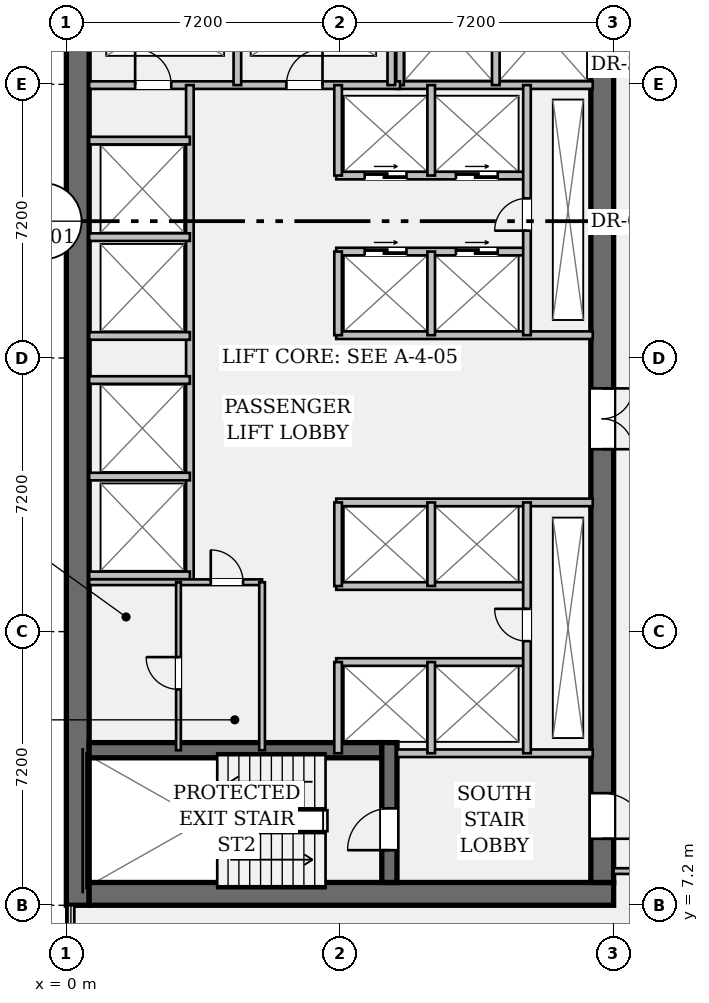
"""IFC4 building model, lengths in metres.
Left out: names, types, materials, properties, quantities, classifications, styles, units other than length and angle.
Written with IfcOpenShell. Run it as: python <this file> out.ifc"""

import sys

from ifc_helpers import new_model, si_unit, direction, frame, frame_2d, origin, place, context, subcontext, project, spatial, rectangle, extrude, element, fill, save


model = new_model("IFC4")
c1 = context("Model", 3, precision=1e-05, world=origin(), true_north=direction((0.0, 1.0)))
c2 = subcontext(c1, "Body", "Model", "MODEL_VIEW")
j1 = project(units=[si_unit("LENGTHUNIT", "METRE"), si_unit("PLANEANGLEUNIT", "RADIAN")], contexts=[c1])
p1 = place(None, origin())
s1 = spatial("IfcSite", under=j1, at=p1, CompositionType="ELEMENT")
p2 = place(p1, origin())
s2 = spatial("IfcBuilding", under=s1, at=p2, CompositionType="ELEMENT")
p3 = place(p2, frame((0.0, 0.0, 81.2)))
s3 = spatial("IfcBuildingStorey", under=s2, at=p3, CompositionType="ELEMENT", Elevation=81.2)
p4 = place(p3, frame((0.3, 7.2, 0.0), z_axis=(0.0, 0.0, 1.0), x_axis=(0.0, 1.0, 0.0)))
e1 = element("IfcWall", 1, at=p4, inside=s3, PredefinedType="SHEAR", context=c2, shape_type="SweptSolid", body=[
    extrude(rectangle(XDim=28.8, YDim=0.6, at=frame_2d((14.4, 0.0))), origin(), (0.0, 0.0, 1.0), 3.57),
])
p5 = place(p3, frame((0.6, 7.5, 0.0), z_axis=(0.0, 0.0, 1.0), x_axis=(1.0, 0.0, 0.0)))
e2 = element("IfcWall", 2, at=p5, inside=s3, PredefinedType="SHEAR", context=c2, shape_type="SweptSolid", body=[
    extrude(rectangle(XDim=13.8, YDim=0.6, at=frame_2d((6.9, 0.0))), origin(), (0.0, 0.0, 1.0), 3.57),
])
p6 = place(p3, frame((14.1, 35.4, 0.0), z_axis=(0.0, 0.0, 1.0), x_axis=(0.0, -1.0, 0.0)))
e3 = element("IfcWall", 3, at=p6, inside=s3, PredefinedType="SHEAR", context=c2, shape_type="SweptSolid", body=[
    extrude(rectangle(XDim=27.6, YDim=0.6, at=frame_2d((13.8, 0.0))), origin(), (0.0, 0.0, 1.0), 3.57),
])
p7 = place(p6, frame((1.3, 0.0, 0.0)))
e4 = element("IfcOpeningElement", 4, at=p7, cuts=e3, PredefinedType="OPENING", context=c2, shape_type="SweptSolid", body=[
    extrude(rectangle(XDim=1.2, YDim=2.15, at=frame_2d((0.6, 1.075))), frame((0.0, 0.312, 0.0), z_axis=(0.0, -1.0, 0.0), x_axis=(1.0, 0.0, 0.0)), (0.0, 0.0, 1.0), 0.624),
])
p8 = place(p6, frame((25.25, 0.0, 0.0)))
e5 = element("IfcOpeningElement", 5, at=p8, cuts=e3, PredefinedType="OPENING", context=c2, shape_type="SweptSolid", body=[
    extrude(rectangle(XDim=1.2, YDim=2.15, at=frame_2d((0.6, 1.075))), frame((0.0, 0.312, 0.0), z_axis=(0.0, -1.0, 0.0), x_axis=(1.0, 0.0, 0.0)), (0.0, 0.0, 1.0), 0.624),
])
p9 = place(p6, frame((14.6, 0.0, 0.0)))
e6 = element("IfcOpeningElement", 6, at=p9, cuts=e3, PredefinedType="OPENING", context=c2, shape_type="SweptSolid", body=[
    extrude(rectangle(XDim=1.6, YDim=2.2, at=frame_2d((0.8, 1.1))), frame((0.0, 0.312, 0.0), z_axis=(0.0, -1.0, 0.0), x_axis=(1.0, 0.0, 0.0)), (0.0, 0.0, 1.0), 0.624),
])
p10 = place(p3, frame((0.6, 11.28, 0.0), z_axis=(0.0, 0.0, 1.0), x_axis=(1.0, 0.0, 0.0)))
e7 = element("IfcWall", 7, at=p10, inside=s3, PredefinedType="SHEAR", context=c2, shape_type="SweptSolid", body=[
    extrude(rectangle(XDim=7.7, YDim=0.4, at=frame_2d((3.85, 0.0))), origin(), (0.0, 0.0, 1.0), 3.57),
])
p11 = place(p3, frame((8.5, 7.8, 0.0), z_axis=(0.0, 0.0, 1.0), x_axis=(0.0, 1.0, 0.0)))
e8 = element("IfcWall", 8, at=p11, inside=s3, PredefinedType="SHEAR", context=c2, shape_type="SweptSolid", body=[
    extrude(rectangle(XDim=3.68, YDim=0.4, at=frame_2d((1.84, 0.0))), origin(), (0.0, 0.0, 1.0), 3.57),
])
p12 = place(p11, frame((0.85, 0.0, 0.0)))
e9 = element("IfcOpeningElement", 9, at=p12, cuts=e8, PredefinedType="OPENING", context=c2, shape_type="SweptSolid", body=[
    extrude(rectangle(XDim=1.1, YDim=2.15, at=frame_2d((0.55, 1.075))), frame((0.0, 0.212, 0.0), z_axis=(0.0, -1.0, 0.0), x_axis=(1.0, 0.0, 0.0)), (0.0, 0.0, 1.0), 0.424),
])
for number, where, z_axis, x_axis in (
    (10, (8.7, 11.2, 0.0), (0.0, 0.0, 1.0), (1.0, 0.0, 0.0)),
    (11, (8.7, 28.78, 0.0), (0.0, 0.0, 1.0), (1.0, 0.0, 0.0)),
):
    element("IfcWall", number, at=place(p3, frame(where, z_axis=z_axis, x_axis=x_axis)), inside=s3, PredefinedType="PARTITIONING", context=c2, shape_type="SweptSolid", body=[
        extrude(rectangle(XDim=5.15, YDim=0.2, at=frame_2d((2.575, 0.0))), origin(), (0.0, 0.0, 1.0), 3.57),
    ])
for number, where, z_axis, x_axis in (
    (12, (8.78, 28.78, 0.0), (0.0, 0.0, 1.0), (0.0, 1.0, 0.0)),
    (13, (11.3, 28.78, 0.0), (0.0, 0.0, 1.0), (0.0, 1.0, 0.0)),
):
    element("IfcWall", number, at=place(p3, frame(where, z_axis=z_axis, x_axis=x_axis)), inside=s3, PredefinedType="PARTITIONING", context=c2, shape_type="SweptSolid", body=[
        extrude(rectangle(XDim=3.1, YDim=0.2, at=frame_2d((1.55, 0.0))), origin(), (0.0, 0.0, 1.0), 3.57),
    ])
p13 = place(p3, frame((0.6, 28.78, 0.0), z_axis=(0.0, 0.0, 1.0), x_axis=(1.0, 0.0, 0.0)))
e14 = element("IfcWall", 14, at=p13, inside=s3, PredefinedType="PARTITIONING", context=c2, shape_type="SweptSolid", body=[
    extrude(rectangle(XDim=8.18, YDim=0.2, at=frame_2d((4.09, 0.0))), origin(), (0.0, 0.0, 1.0), 3.57),
])
p14 = place(p13, frame((1.21, 0.0, 0.0)))
e15 = element("IfcOpeningElement", 15, at=p14, cuts=e14, PredefinedType="OPENING", context=c2, shape_type="SweptSolid", body=[
    extrude(rectangle(XDim=0.95, YDim=2.15, at=frame_2d((0.475, 1.075))), frame((0.0, 0.112, 0.0), z_axis=(0.0, -1.0, 0.0), x_axis=(1.0, 0.0, 0.0)), (0.0, 0.0, 1.0), 0.224),
])
p15 = place(p13, frame((5.19, 0.0, 0.0)))
e16 = element("IfcOpeningElement", 16, at=p15, cuts=e14, PredefinedType="OPENING", context=c2, shape_type="SweptSolid", body=[
    extrude(rectangle(XDim=0.95, YDim=2.15, at=frame_2d((0.475, 1.075))), frame((0.0, 0.112, 0.0), z_axis=(0.0, -1.0, 0.0), x_axis=(1.0, 0.0, 0.0)), (0.0, 0.0, 1.0), 0.224),
])
for number, where, z_axis, x_axis in (
    (17, (4.5, 28.78, 0.0), (0.0, 0.0, 1.0), (0.0, 1.0, 0.0)),
    (18, (8.55, 28.78, 0.0), (0.0, 0.0, 1.0), (0.0, 1.0, 0.0)),
):
    element("IfcWall", number, at=place(p3, frame(where, z_axis=z_axis, x_axis=x_axis)), inside=s3, PredefinedType="PARTITIONING", context=c2, shape_type="SweptSolid", body=[
        extrude(rectangle(XDim=2.94, YDim=0.2, at=frame_2d((1.47, 0.0))), origin(), (0.0, 0.0, 1.0), 3.57),
    ])
p16 = place(p3, frame((3.25, 15.7, 0.0), z_axis=(0.0, 0.0, 1.0), x_axis=(0.0, 1.0, 0.0)))
e19 = element("IfcWall", 19, at=p16, inside=s3, PredefinedType="PARTITIONING", context=c2, shape_type="SweptSolid", body=[
    extrude(rectangle(XDim=13.08, YDim=0.2, at=frame_2d((6.54, 0.0))), origin(), (0.0, 0.0, 1.0), 3.57),
])
for number, where, z_axis, x_axis in (
    (20, (0.6, 15.88, 0.0), (0.0, 0.0, 1.0), (1.0, 0.0, 0.0)),
    (21, (0.6, 18.48, 0.0), (0.0, 0.0, 1.0), (1.0, 0.0, 0.0)),
    (22, (0.6, 22.18, 0.0), (0.0, 0.0, 1.0), (1.0, 0.0, 0.0)),
    (23, (0.6, 24.78, 0.0), (0.0, 0.0, 1.0), (1.0, 0.0, 0.0)),
    (24, (0.6, 21.02, 0.0), (0.0, 0.0, 1.0), (1.0, 0.0, 0.0)),
    (25, (0.6, 27.32, 0.0), (0.0, 0.0, 1.0), (1.0, 0.0, 0.0)),
):
    element("IfcWall", number, at=place(p3, frame(where, z_axis=z_axis, x_axis=x_axis)), inside=s3, PredefinedType="PARTITIONING", context=c2, shape_type="SweptSolid", body=[
        extrude(rectangle(XDim=2.65, YDim=0.2, at=frame_2d((1.325, 0.0))), origin(), (0.0, 0.0, 1.0), 3.57),
    ])
p17 = place(p3, frame((7.1, 22.2, 0.0), z_axis=(0.0, 0.0, 1.0), x_axis=(1.0, 0.0, 0.0)))
e26 = element("IfcWall", 26, at=p17, inside=s3, PredefinedType="PARTITIONING", context=c2, shape_type="SweptSolid", body=[
    extrude(rectangle(XDim=6.75, YDim=0.2, at=frame_2d((3.375, 0.0))), origin(), (0.0, 0.0, 1.0), 3.57),
])
p18 = place(p3, frame((7.1, 24.4, 0.0), z_axis=(0.0, 0.0, 1.0), x_axis=(1.0, 0.0, 0.0)))
e27 = element("IfcWall", 27, at=p18, inside=s3, PredefinedType="PARTITIONING", context=c2, shape_type="SweptSolid", body=[
    extrude(rectangle(XDim=5.02, YDim=0.2, at=frame_2d((2.51, 0.0))), origin(), (0.0, 0.0, 1.0), 3.57),
])
p19 = place(p18, frame((0.75, 0.0, 0.0)))
e28 = element("IfcOpeningElement", 28, at=p19, cuts=e27, PredefinedType="OPENING", context=c2, shape_type="SweptSolid", body=[
    extrude(rectangle(XDim=1.1, YDim=2.2, at=frame_2d((0.55, 1.1))), frame((0.0, 0.112, 0.0), z_axis=(0.0, -1.0, 0.0), x_axis=(1.0, 0.0, 0.0)), (0.0, 0.0, 1.0), 0.224),
])
p20 = place(p18, frame((3.15, 0.0, 0.0)))
e29 = element("IfcOpeningElement", 29, at=p20, cuts=e27, PredefinedType="OPENING", context=c2, shape_type="SweptSolid", body=[
    extrude(rectangle(XDim=1.1, YDim=2.2, at=frame_2d((0.55, 1.1))), frame((0.0, 0.112, 0.0), z_axis=(0.0, -1.0, 0.0), x_axis=(1.0, 0.0, 0.0)), (0.0, 0.0, 1.0), 0.224),
])
p21 = place(p3, frame((7.1, 26.4, 0.0), z_axis=(0.0, 0.0, 1.0), x_axis=(1.0, 0.0, 0.0)))
e30 = element("IfcWall", 30, at=p21, inside=s3, PredefinedType="PARTITIONING", context=c2, shape_type="SweptSolid", body=[
    extrude(rectangle(XDim=5.02, YDim=0.2, at=frame_2d((2.51, 0.0))), origin(), (0.0, 0.0, 1.0), 3.57),
])
p22 = place(p21, frame((0.75, 0.0, 0.0)))
e31 = element("IfcOpeningElement", 31, at=p22, cuts=e30, PredefinedType="OPENING", context=c2, shape_type="SweptSolid", body=[
    extrude(rectangle(XDim=1.1, YDim=2.2, at=frame_2d((0.55, 1.1))), frame((0.0, 0.112, 0.0), z_axis=(0.0, -1.0, 0.0), x_axis=(1.0, 0.0, 0.0)), (0.0, 0.0, 1.0), 0.224),
])
p23 = place(p21, frame((3.15, 0.0, 0.0)))
e32 = element("IfcOpeningElement", 32, at=p23, cuts=e30, PredefinedType="OPENING", context=c2, shape_type="SweptSolid", body=[
    extrude(rectangle(XDim=1.1, YDim=2.2, at=frame_2d((0.55, 1.1))), frame((0.0, 0.112, 0.0), z_axis=(0.0, -1.0, 0.0), x_axis=(1.0, 0.0, 0.0)), (0.0, 0.0, 1.0), 0.224),
])
p24 = place(p3, frame((7.15, 22.2, 0.0), z_axis=(0.0, 0.0, 1.0), x_axis=(0.0, 1.0, 0.0)))
e33 = element("IfcWall", 33, at=p24, inside=s3, PredefinedType="PARTITIONING", context=c2, shape_type="SweptSolid", body=[
    extrude(rectangle(XDim=2.2, YDim=0.2, at=frame_2d((1.1, 0.0))), origin(), (0.0, 0.0, 1.0), 3.57),
])
p25 = place(p3, frame((7.15, 26.4, 0.0), z_axis=(0.0, 0.0, 1.0), x_axis=(0.0, 1.0, 0.0)))
e34 = element("IfcWall", 34, at=p25, inside=s3, PredefinedType="PARTITIONING", context=c2, shape_type="SweptSolid", body=[
    extrude(rectangle(XDim=2.38, YDim=0.2, at=frame_2d((1.19, 0.0))), origin(), (0.0, 0.0, 1.0), 3.57),
])
p26 = place(p3, frame((9.6, 22.2, 0.0), z_axis=(0.0, 0.0, 1.0), x_axis=(0.0, 1.0, 0.0)))
e35 = element("IfcWall", 35, at=p26, inside=s3, PredefinedType="PARTITIONING", context=c2, shape_type="SweptSolid", body=[
    extrude(rectangle(XDim=2.2, YDim=0.2, at=frame_2d((1.1, 0.0))), origin(), (0.0, 0.0, 1.0), 3.57),
])
p27 = place(p3, frame((9.6, 26.4, 0.0), z_axis=(0.0, 0.0, 1.0), x_axis=(0.0, 1.0, 0.0)))
e36 = element("IfcWall", 36, at=p27, inside=s3, PredefinedType="PARTITIONING", context=c2, shape_type="SweptSolid", body=[
    extrude(rectangle(XDim=2.38, YDim=0.2, at=frame_2d((1.19, 0.0))), origin(), (0.0, 0.0, 1.0), 3.57),
])
p28 = place(p3, frame((12.12, 22.2, 0.0), z_axis=(0.0, 0.0, 1.0), x_axis=(0.0, 1.0, 0.0)))
e37 = element("IfcWall", 37, at=p28, inside=s3, PredefinedType="PARTITIONING", context=c2, shape_type="SweptSolid", body=[
    extrude(rectangle(XDim=6.58, YDim=0.2, at=frame_2d((3.29, 0.0))), origin(), (0.0, 0.0, 1.0), 3.57),
])
p29 = place(p28, frame((2.75, 0.0, 0.0)))
e38 = element("IfcOpeningElement", 38, at=p29, cuts=e37, PredefinedType="OPENING", context=c2, shape_type="SweptSolid", body=[
    extrude(rectangle(XDim=0.85, YDim=2.15, at=frame_2d((0.425, 1.075))), frame((0.0, 0.112, 0.0), z_axis=(0.0, -1.0, 0.0), x_axis=(1.0, 0.0, 0.0)), (0.0, 0.0, 1.0), 0.224),
])
p30 = place(p3, frame((7.1, 17.8, 0.0), z_axis=(0.0, 0.0, 1.0), x_axis=(1.0, 0.0, 0.0)))
e39 = element("IfcWall", 39, at=p30, inside=s3, PredefinedType="PARTITIONING", context=c2, shape_type="SweptSolid", body=[
    extrude(rectangle(XDim=6.75, YDim=0.2, at=frame_2d((3.375, 0.0))), origin(), (0.0, 0.0, 1.0), 3.57),
])
for number, where, z_axis, x_axis in (
    (40, (7.1, 15.6, 0.0), (0.0, 0.0, 1.0), (1.0, 0.0, 0.0)),
    (41, (7.1, 13.6, 0.0), (0.0, 0.0, 1.0), (1.0, 0.0, 0.0)),
):
    element("IfcWall", number, at=place(p3, frame(where, z_axis=z_axis, x_axis=x_axis)), inside=s3, PredefinedType="PARTITIONING", context=c2, shape_type="SweptSolid", body=[
        extrude(rectangle(XDim=5.02, YDim=0.2, at=frame_2d((2.51, 0.0))), origin(), (0.0, 0.0, 1.0), 3.57),
    ])
p31 = place(p3, frame((7.15, 15.6, 0.0), z_axis=(0.0, 0.0, 1.0), x_axis=(0.0, 1.0, 0.0)))
e42 = element("IfcWall", 42, at=p31, inside=s3, PredefinedType="PARTITIONING", context=c2, shape_type="SweptSolid", body=[
    extrude(rectangle(XDim=2.2, YDim=0.2, at=frame_2d((1.1, 0.0))), origin(), (0.0, 0.0, 1.0), 3.57),
])
p32 = place(p3, frame((7.15, 11.2, 0.0), z_axis=(0.0, 0.0, 1.0), x_axis=(0.0, 1.0, 0.0)))
e43 = element("IfcWall", 43, at=p32, inside=s3, PredefinedType="PARTITIONING", context=c2, shape_type="SweptSolid", body=[
    extrude(rectangle(XDim=2.4, YDim=0.2, at=frame_2d((1.2, 0.0))), origin(), (0.0, 0.0, 1.0), 3.57),
])
p33 = place(p3, frame((9.6, 15.6, 0.0), z_axis=(0.0, 0.0, 1.0), x_axis=(0.0, 1.0, 0.0)))
e44 = element("IfcWall", 44, at=p33, inside=s3, PredefinedType="PARTITIONING", context=c2, shape_type="SweptSolid", body=[
    extrude(rectangle(XDim=2.2, YDim=0.2, at=frame_2d((1.1, 0.0))), origin(), (0.0, 0.0, 1.0), 3.57),
])
p34 = place(p3, frame((9.6, 11.2, 0.0), z_axis=(0.0, 0.0, 1.0), x_axis=(0.0, 1.0, 0.0)))
e45 = element("IfcWall", 45, at=p34, inside=s3, PredefinedType="PARTITIONING", context=c2, shape_type="SweptSolid", body=[
    extrude(rectangle(XDim=2.4, YDim=0.2, at=frame_2d((1.2, 0.0))), origin(), (0.0, 0.0, 1.0), 3.57),
])
p35 = place(p3, frame((12.12, 11.2, 0.0), z_axis=(0.0, 0.0, 1.0), x_axis=(0.0, 1.0, 0.0)))
e46 = element("IfcWall", 46, at=p35, inside=s3, PredefinedType="PARTITIONING", context=c2, shape_type="SweptSolid", body=[
    extrude(rectangle(XDim=6.6, YDim=0.2, at=frame_2d((3.3, 0.0))), origin(), (0.0, 0.0, 1.0), 3.57),
])
p36 = place(p35, frame((2.95, 0.0, 0.0)))
e47 = element("IfcOpeningElement", 47, at=p36, cuts=e46, PredefinedType="OPENING", context=c2, shape_type="SweptSolid", body=[
    extrude(rectangle(XDim=0.85, YDim=2.15, at=frame_2d((0.425, 1.075))), frame((0.0, 0.112, 0.0), z_axis=(0.0, -1.0, 0.0), x_axis=(1.0, 0.0, 0.0)), (0.0, 0.0, 1.0), 0.224),
])
p37 = place(p3, frame((0.6, 15.7, 0.0), z_axis=(0.0, 0.0, 1.0), x_axis=(1.0, 0.0, 0.0)))
e48 = element("IfcWall", 48, at=p37, inside=s3, PredefinedType="PARTITIONING", context=c2, shape_type="SweptSolid", body=[
    extrude(rectangle(XDim=4.55, YDim=0.15, at=frame_2d((2.275, 0.0))), origin(), (0.0, 0.0, 1.0), 3.57),
])
p38 = place(p37, frame((3.2, 0.0, 0.0)))
e49 = element("IfcOpeningElement", 49, at=p38, cuts=e48, PredefinedType="OPENING", context=c2, shape_type="SweptSolid", body=[
    extrude(rectangle(XDim=0.85, YDim=2.15, at=frame_2d((0.425, 1.075))), frame((0.0, 0.087, 0.0), z_axis=(0.0, -1.0, 0.0), x_axis=(1.0, 0.0, 0.0)), (0.0, 0.0, 1.0), 0.174),
])
p39 = place(p3, frame((5.15, 11.28, 0.0), z_axis=(0.0, 0.0, 1.0), x_axis=(0.0, 1.0, 0.0)))
e50 = element("IfcWall", 50, at=p39, inside=s3, PredefinedType="PARTITIONING", context=c2, shape_type="SweptSolid", body=[
    extrude(rectangle(XDim=4.42, YDim=0.15, at=frame_2d((2.21, 0.0))), origin(), (0.0, 0.0, 1.0), 3.57),
])
p40 = place(p3, frame((2.95, 11.28, 0.0), z_axis=(0.0, 0.0, 1.0), x_axis=(0.0, 1.0, 0.0)))
e51 = element("IfcWall", 51, at=p40, inside=s3, PredefinedType="PARTITIONING", context=c2, shape_type="SweptSolid", body=[
    extrude(rectangle(XDim=4.42, YDim=0.125, at=frame_2d((2.21, 0.0))), origin(), (0.0, 0.0, 1.0), 3.57),
])
p41 = place(p40, frame((1.6, 0.0, 0.0)))
e52 = element("IfcOpeningElement", 52, at=p41, cuts=e51, PredefinedType="OPENING", context=c2, shape_type="SweptSolid", body=[
    extrude(rectangle(XDim=0.85, YDim=2.15, at=frame_2d((0.425, 1.075))), frame((0.0, 0.074, 0.0), z_axis=(0.0, -1.0, 0.0), x_axis=(1.0, 0.0, 0.0)), (0.0, 0.0, 1.0), 0.149),
])
p42 = place(p3, frame((14.4, 8.1, 0.0), z_axis=(0.0, 0.0, 1.0), x_axis=(1.0, 0.0, 0.0)))
e53 = element("IfcWall", 53, at=p42, inside=s3, PredefinedType="PARTITIONING", context=c2, shape_type="SweptSolid", body=[
    extrude(rectangle(XDim=2.95, YDim=0.15, at=frame_2d((1.475, 0.0))), origin(), (0.0, 0.0, 1.0), 3.088),
])
p43 = place(p42, frame((0.95, 0.0, 0.0)))
e54 = element("IfcOpeningElement", 54, at=p43, cuts=e53, PredefinedType="OPENING", context=c2, shape_type="SweptSolid", body=[
    extrude(rectangle(XDim=0.95, YDim=2.15, at=frame_2d((0.475, 1.075))), frame((0.0, 0.087, 0.0), z_axis=(0.0, -1.0, 0.0), x_axis=(1.0, 0.0, 0.0)), (0.0, 0.0, 1.0), 0.174),
])
p44 = place(p12, origin())
e55 = element("IfcDoor", 55, at=p44, inside=s3, OperationType="SINGLE_SWING_LEFT", PredefinedType="DOOR", context=c2, shape_type="SweptSolid", body=[
    extrude(rectangle(XDim=1.1, YDim=2.15, at=frame_2d((0.55, 1.075))), frame((0.0, 0.025, 0.0), z_axis=(0.0, -1.0, 0.0), x_axis=(1.0, 0.0, 0.0)), (0.0, 0.0, 1.0), 0.05),
])
fill(e9, e55)
p45 = place(p8, origin())
e56 = element("IfcDoor", 56, at=p45, inside=s3, OperationType="SINGLE_SWING_RIGHT", PredefinedType="DOOR", context=c2, shape_type="SweptSolid", body=[
    extrude(rectangle(XDim=1.2, YDim=2.15, at=frame_2d((0.6, 1.075))), frame((0.0, 0.025, 0.0), z_axis=(0.0, -1.0, 0.0), x_axis=(1.0, 0.0, 0.0)), (0.0, 0.0, 1.0), 0.05),
])
fill(e5, e56)
p46 = place(p14, origin())
e57 = element("IfcDoor", 57, at=p46, inside=s3, OperationType="SINGLE_SWING_LEFT", PredefinedType="DOOR", context=c2, shape_type="SweptSolid", body=[
    extrude(rectangle(XDim=0.95, YDim=2.15, at=frame_2d((0.475, 1.075))), frame((0.0, 0.025, 0.0), z_axis=(0.0, -1.0, 0.0), x_axis=(1.0, 0.0, 0.0)), (0.0, 0.0, 1.0), 0.05),
])
fill(e15, e57)
p47 = place(p15, origin())
e58 = element("IfcDoor", 58, at=p47, inside=s3, OperationType="SINGLE_SWING_RIGHT", PredefinedType="DOOR", context=c2, shape_type="SweptSolid", body=[
    extrude(rectangle(XDim=0.95, YDim=2.15, at=frame_2d((0.475, 1.075))), frame((0.0, 0.025, 0.0), z_axis=(0.0, -1.0, 0.0), x_axis=(1.0, 0.0, 0.0)), (0.0, 0.0, 1.0), 0.05),
])
fill(e16, e58)
p48 = place(p9, origin())
e59 = element("IfcDoor", 59, at=p48, inside=s3, OperationType="DOUBLE_DOOR_SINGLE_SWING", PredefinedType="DOOR", context=c2, shape_type="SweptSolid", body=[
    extrude(rectangle(XDim=1.6, YDim=2.2, at=frame_2d((0.8, 1.1))), frame((0.0, 0.025, 0.0), z_axis=(0.0, -1.0, 0.0), x_axis=(1.0, 0.0, 0.0)), (0.0, 0.0, 1.0), 0.05),
])
fill(e6, e59)
p49 = place(p29, origin())
e60 = element("IfcDoor", 60, at=p49, inside=s3, OperationType="SINGLE_SWING_LEFT", PredefinedType="DOOR", context=c2, shape_type="SweptSolid", body=[
    extrude(rectangle(XDim=0.85, YDim=2.15, at=frame_2d((0.425, 1.075))), frame((0.0, 0.025, 0.0), z_axis=(0.0, -1.0, 0.0), x_axis=(1.0, 0.0, 0.0)), (0.0, 0.0, 1.0), 0.05),
])
fill(e38, e60)
p50 = place(p19, origin())
e61 = element("IfcDoor", 61, at=p50, inside=s3, OperationType="DOUBLE_DOOR_SLIDING", PredefinedType="DOOR", context=c2, shape_type="SweptSolid", body=[
    extrude(rectangle(XDim=1.1, YDim=2.2, at=frame_2d((0.55, 1.1))), frame((0.0, 0.025, 0.0), z_axis=(0.0, -1.0, 0.0), x_axis=(1.0, 0.0, 0.0)), (0.0, 0.0, 1.0), 0.05),
])
fill(e28, e61)
p51 = place(p20, origin())
e62 = element("IfcDoor", 62, at=p51, inside=s3, OperationType="DOUBLE_DOOR_SLIDING", PredefinedType="DOOR", context=c2, shape_type="SweptSolid", body=[
    extrude(rectangle(XDim=1.1, YDim=2.2, at=frame_2d((0.55, 1.1))), frame((0.0, 0.025, 0.0), z_axis=(0.0, -1.0, 0.0), x_axis=(1.0, 0.0, 0.0)), (0.0, 0.0, 1.0), 0.05),
])
fill(e29, e62)
p52 = place(p22, origin())
e63 = element("IfcDoor", 63, at=p52, inside=s3, OperationType="DOUBLE_DOOR_SLIDING", PredefinedType="DOOR", context=c2, shape_type="SweptSolid", body=[
    extrude(rectangle(XDim=1.1, YDim=2.2, at=frame_2d((0.55, 1.1))), frame((0.0, 0.025, 0.0), z_axis=(0.0, -1.0, 0.0), x_axis=(1.0, 0.0, 0.0)), (0.0, 0.0, 1.0), 0.05),
])
fill(e31, e63)
p53 = place(p23, origin())
e64 = element("IfcDoor", 64, at=p53, inside=s3, OperationType="DOUBLE_DOOR_SLIDING", PredefinedType="DOOR", context=c2, shape_type="SweptSolid", body=[
    extrude(rectangle(XDim=1.1, YDim=2.2, at=frame_2d((0.55, 1.1))), frame((0.0, 0.025, 0.0), z_axis=(0.0, -1.0, 0.0), x_axis=(1.0, 0.0, 0.0)), (0.0, 0.0, 1.0), 0.05),
])
fill(e32, e64)
p54 = place(p36, origin())
e65 = element("IfcDoor", 65, at=p54, inside=s3, OperationType="SINGLE_SWING_RIGHT", PredefinedType="DOOR", context=c2, shape_type="SweptSolid", body=[
    extrude(rectangle(XDim=0.85, YDim=2.15, at=frame_2d((0.425, 1.075))), frame((0.0, 0.025, 0.0), z_axis=(0.0, -1.0, 0.0), x_axis=(1.0, 0.0, 0.0)), (0.0, 0.0, 1.0), 0.05),
])
fill(e47, e65)
p55 = place(p38, origin())
e66 = element("IfcDoor", 66, at=p55, inside=s3, OperationType="SINGLE_SWING_LEFT", PredefinedType="DOOR", context=c2, shape_type="SweptSolid", body=[
    extrude(rectangle(XDim=0.85, YDim=2.15, at=frame_2d((0.425, 1.075))), frame((0.0, 0.025, 0.0), z_axis=(0.0, -1.0, 0.0), x_axis=(1.0, 0.0, 0.0)), (0.0, 0.0, 1.0), 0.05),
])
fill(e49, e66)
p56 = place(p41, origin())
e67 = element("IfcDoor", 67, at=p56, inside=s3, OperationType="SINGLE_SWING_RIGHT", PredefinedType="DOOR", context=c2, shape_type="SweptSolid", body=[
    extrude(rectangle(XDim=0.85, YDim=2.15, at=frame_2d((0.425, 1.075))), frame((0.0, 0.025, 0.0), z_axis=(0.0, -1.0, 0.0), x_axis=(1.0, 0.0, 0.0)), (0.0, 0.0, 1.0), 0.05),
])
fill(e52, e67)
save(model, sys.argv[1])
